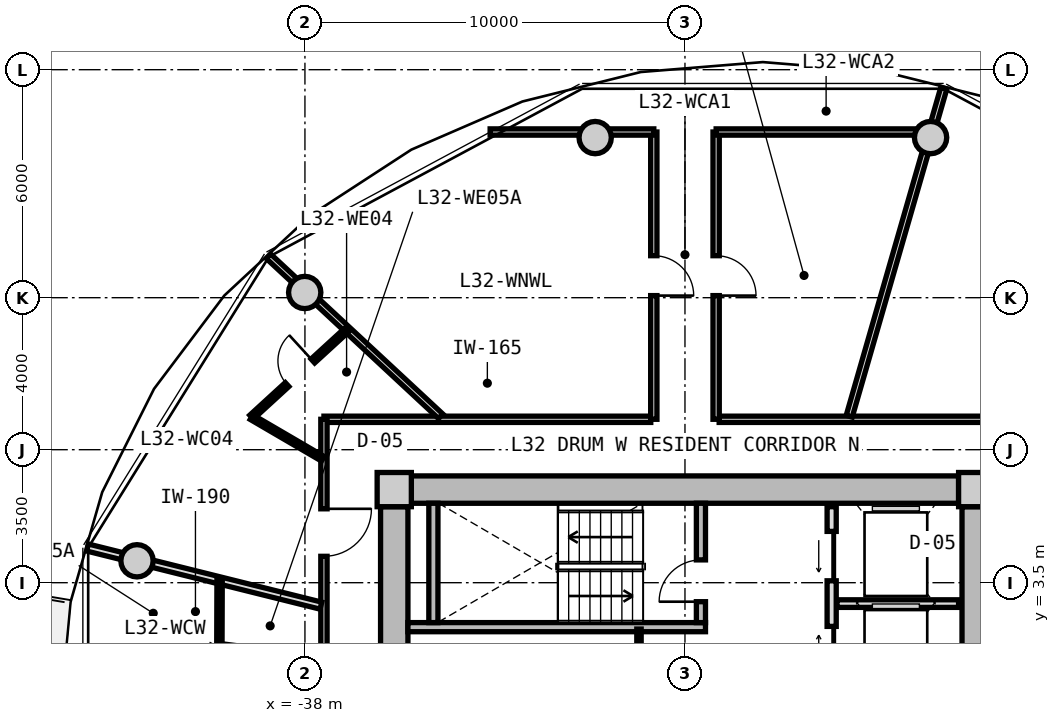
"""IFC4 building model, lengths in metres.
Left out: names, types, materials, properties, quantities, classifications, styles, units other than length and angle.
Written with IfcOpenShell. Run it as: python <this file> out.ifc"""

import sys

from ifc_helpers import new_model, si_unit, direction, frame, frame_2d, origin, origin_2d, place, context, subcontext, project, spatial, rectangle, circle, extrude, source, transform, mapped, element, fill, save


model = new_model("IFC4")
c1 = context("Model", 3, precision=1e-05, world=origin(), true_north=direction((0.0, 1.0)))
c2 = subcontext(c1, "Body", "Model", "MODEL_VIEW")
j1 = project(units=[si_unit("LENGTHUNIT", "METRE"), si_unit("PLANEANGLEUNIT", "RADIAN")], contexts=[c1])
p1 = place(None, origin())
s1 = spatial("IfcSite", under=j1, at=p1, CompositionType="ELEMENT")
p2 = place(p1, origin())
s2 = spatial("IfcBuilding", under=s1, at=p2, CompositionType="ELEMENT")
p3 = place(p2, frame((0.0, 0.0, 105.4)))
s3 = spatial("IfcBuildingStorey", under=s2, at=p3, CompositionType="ELEMENT", Elevation=105.4)
m1 = source(origin(), c2, "Body", "SweptSolid", [
    extrude(rectangle(XDim=0.9, YDim=0.9, at=origin_2d()), origin(), (0.0, 0.0, 1.0), 3.05),
])
for number, where, z_axis, x_axis in (
    (1, (-20.35, 5.95, 0.0), (0.0, 0.0, 1.0), (1.0, 0.0, 0.0)),
    (2, (-35.65, 5.95, 0.0), (0.0, 0.0, 1.0), (1.0, 0.0, 0.0)),
):
    element("IfcColumn", number, at=place(p3, frame(where, z_axis=z_axis, x_axis=x_axis)), inside=s3, PredefinedType="COLUMN", context=c2, shape_type="MappedRepresentation", body=[
        mapped(m1, transform((0.0, 0.0, 0.0), x_axis=(1.0, 0.0, 0.0), y_axis=(0.0, 1.0, 0.0), z_axis=(0.0, 0.0, 1.0), scale=1.0)),
    ])
m2 = source(origin(), c2, "Body", "SweptSolid", [
    extrude(rectangle(XDim=14.4, YDim=0.72, at=frame_2d((7.2, 0.0))), origin(), (0.0, 0.0, 1.0), 2.79),
])
p4 = place(p3, frame((-35.2, 5.95, 0.0), z_axis=(0.0, 0.0, 1.0), x_axis=(1.0, 0.0, 0.0)))
e3 = element("IfcWall", 3, at=p4, inside=s3, PredefinedType="SHEAR", context=c2, shape_type="MappedRepresentation", body=[
    mapped(m2, transform((0.0, 0.0, 0.0), x_axis=(1.0, 0.0, 0.0), y_axis=(0.0, 1.0, 0.0), z_axis=(0.0, 0.0, 1.0), scale=1.0)),
])
m3 = source(origin(), c2, "Body", "SweptSolid", [
    extrude(rectangle(XDim=11.0, YDim=0.72, at=frame_2d((5.5, 0.0))), origin(), (0.0, 0.0, 1.0), 2.79),
])
p5 = place(p3, frame((-35.65, -5.5, 0.0), z_axis=(0.0, 0.0, 1.0), x_axis=(0.0, 1.0, 0.0)))
e4 = element("IfcWall", 4, at=p5, inside=s3, PredefinedType="SHEAR", context=c2, shape_type="MappedRepresentation", body=[
    mapped(m3, transform((0.0, 0.0, 0.0), x_axis=(1.0, 0.0, 0.0), y_axis=(0.0, 1.0, 0.0), z_axis=(0.0, 0.0, 1.0), scale=1.0)),
])
p6 = place(p5, frame((3.8, 0.0, 0.0)))
e5 = element("IfcOpeningElement", 5, at=p6, cuts=e4, PredefinedType="OPENING", context=c2, shape_type="SweptSolid", body=[
    extrude(rectangle(XDim=1.2, YDim=2.15, at=frame_2d((0.6, 1.075))), frame((0.0, 0.37, 0.0), z_axis=(0.0, -1.0, 0.0), x_axis=(1.0, 0.0, 0.0)), (0.0, 0.0, 1.0), 0.74),
])
p7 = place(p3, frame((-20.35, 5.5, 0.0), z_axis=(0.0, 0.0, 1.0), x_axis=(0.0, -1.0, 0.0)))
e6 = element("IfcWall", 6, at=p7, inside=s3, PredefinedType="SHEAR", context=c2, shape_type="MappedRepresentation", body=[
    mapped(m3, transform((0.0, 0.0, 0.0), x_axis=(1.0, 0.0, 0.0), y_axis=(0.0, 1.0, 0.0), z_axis=(0.0, 0.0, 1.0), scale=1.0)),
])
p8 = place(p7, frame((5.65, 0.0, 0.0)))
e7 = element("IfcOpeningElement", 7, at=p8, cuts=e6, PredefinedType="OPENING", context=c2, shape_type="SweptSolid", body=[
    extrude(rectangle(XDim=1.2, YDim=2.15, at=frame_2d((0.6, 1.075))), frame((0.0, 0.37, 0.0), z_axis=(0.0, -1.0, 0.0), x_axis=(1.0, 0.0, 0.0)), (0.0, 0.0, 1.0), 0.74),
])
m4 = source(origin(), c2, "Body", "SweptSolid", [
    extrude(circle(Radius=0.425, at=origin_2d()), origin(), (0.0, 0.0, 1.0), 3.05),
])
for number, where, z_axis, x_axis in (
    (8, (-21.537, 15.213, 0.0), (0.0, 0.0, 1.0), (1.0, 0.0, 0.0)),
    (9, (-30.363, 15.213, 0.0), (0.0, 0.0, 1.0), (1.0, 0.0, 0.0)),
    (10, (-38.006, 11.137, 0.0), (0.0, 0.0, 1.0), (1.0, 0.0, 0.0)),
    (11, (-42.419, 4.076, 0.0), (0.0, 0.0, 1.0), (1.0, 0.0, 0.0)),
):
    element("IfcColumn", number, at=place(p3, frame(where, z_axis=z_axis, x_axis=x_axis)), inside=s3, PredefinedType="COLUMN", context=c2, shape_type="MappedRepresentation", body=[
        mapped(m4, transform((0.0, 0.0, 0.0), x_axis=(1.0, 0.0, 0.0), y_axis=(0.0, 1.0, 0.0), z_axis=(0.0, 0.0, 1.0), scale=1.0)),
    ])
m5 = source(origin(), c2, "Body", "SweptSolid", [
    extrude(rectangle(XDim=7.83, YDim=0.24, at=frame_2d((3.915, 0.0))), origin(), (0.0, 0.0, 1.0), 2.79),
])
p9 = place(p3, frame((-35.29, 2.33, 0.0), z_axis=(0.0, 0.0, 1.0), x_axis=(1.0, 0.0, 0.0)))
e12 = element("IfcWall", 12, at=p9, inside=s3, PredefinedType="PARTITIONING", context=c2, shape_type="MappedRepresentation", body=[
    mapped(m5, transform((0.0, 0.0, 0.0), x_axis=(1.0, 0.0, 0.0), y_axis=(0.0, 1.0, 0.0), z_axis=(0.0, 0.0, 1.0), scale=1.0)),
])
m6 = source(origin(), c2, "Body", "SweptSolid", [
    extrude(rectangle(XDim=3.14, YDim=0.24, at=frame_2d((1.57, 0.0))), origin(), (0.0, 0.0, 1.0), 2.79),
])
p10 = place(p3, frame((-34.62, 2.45, 0.0), z_axis=(0.0, 0.0, 1.0), x_axis=(0.0, 1.0, 0.0)))
e13 = element("IfcWall", 13, at=p10, inside=s3, PredefinedType="PARTITIONING", context=c2, shape_type="MappedRepresentation", body=[
    mapped(m6, transform((0.0, 0.0, 0.0), x_axis=(1.0, 0.0, 0.0), y_axis=(0.0, 1.0, 0.0), z_axis=(0.0, 0.0, 1.0), scale=1.0)),
])
p11 = place(p3, frame((-27.58, 2.45, 0.0), z_axis=(0.0, 0.0, 1.0), x_axis=(0.0, 1.0, 0.0)))
e14 = element("IfcWall", 14, at=p11, inside=s3, PredefinedType="PARTITIONING", context=c2, shape_type="MappedRepresentation", body=[
    mapped(m6, transform((0.0, 0.0, 0.0), x_axis=(1.0, 0.0, 0.0), y_axis=(0.0, 1.0, 0.0), z_axis=(0.0, 0.0, 1.0), scale=1.0)),
])
p12 = place(p11, frame((0.55, 0.0, 0.0)))
e15 = element("IfcOpeningElement", 15, at=p12, cuts=e14, PredefinedType="OPENING", context=c2, shape_type="SweptSolid", body=[
    extrude(rectangle(XDim=1.1, YDim=2.15, at=frame_2d((0.55, 1.075))), frame((0.0, 0.13, 0.0), z_axis=(0.0, -1.0, 0.0), x_axis=(1.0, 0.0, 0.0)), (0.0, 0.0, 1.0), 0.26),
])
m7 = source(origin(), c2, "Body", "SweptSolid", [
    extrude(rectangle(XDim=5.0, YDim=0.24, at=frame_2d((2.5, 0.0))), origin(), (0.0, 0.0, 1.0), 2.775),
])
p13 = place(p3, frame((-24.14, 0.5, 0.0), z_axis=(0.0, 0.0, 1.0), x_axis=(0.0, 1.0, 0.0)))
e16 = element("IfcWall", 16, at=p13, inside=s3, PredefinedType="PARTITIONING", context=c2, shape_type="MappedRepresentation", body=[
    mapped(m7, transform((0.0, 0.0, 0.0), x_axis=(1.0, 0.0, 0.0), y_axis=(0.0, 1.0, 0.0), z_axis=(0.0, 0.0, 1.0), scale=1.0)),
])
p14 = place(p13, frame((3.05, 0.0, 0.0)))
e17 = element("IfcOpeningElement", 17, at=p14, cuts=e16, PredefinedType="OPENING", context=c2, shape_type="SweptSolid", body=[
    extrude(rectangle(XDim=1.3, YDim=2.2, at=frame_2d((0.65, 1.1))), frame((0.0, 0.13, 0.0), z_axis=(0.0, -1.0, 0.0), x_axis=(1.0, 0.0, 0.0)), (0.0, 0.0, 1.0), 0.26),
])
p15 = place(p13, frame((0.55, 0.0, 0.0)))
e18 = element("IfcOpeningElement", 18, at=p15, cuts=e16, PredefinedType="OPENING", context=c2, shape_type="SweptSolid", body=[
    extrude(rectangle(XDim=1.3, YDim=2.2, at=frame_2d((0.65, 1.1))), frame((0.0, 0.13, 0.0), z_axis=(0.0, -1.0, 0.0), x_axis=(1.0, 0.0, 0.0)), (0.0, 0.0, 1.0), 0.26),
])
m8 = source(origin(), c2, "Body", "SweptSolid", [
    extrude(rectangle(XDim=3.2, YDim=0.2, at=frame_2d((1.6, 0.0))), origin(), (0.0, 0.0, 1.0), 2.775),
])
p16 = place(p3, frame((-24.0, 2.95, 0.0), z_axis=(0.0, 0.0, 1.0), x_axis=(1.0, 0.0, 0.0)))
e19 = element("IfcWall", 19, at=p16, inside=s3, PredefinedType="PARTITIONING", context=c2, shape_type="MappedRepresentation", body=[
    mapped(m8, transform((0.0, 0.0, 0.0), x_axis=(1.0, 0.0, 0.0), y_axis=(0.0, 1.0, 0.0), z_axis=(0.0, 0.0, 1.0), scale=1.0)),
])
m9 = source(origin(), c2, "Body", "SweptSolid", [
    extrude(rectangle(XDim=2.33, YDim=0.115, at=frame_2d((1.165, 0.0))), origin(), (0.0, 0.0, 1.0), 2.775),
])
p17 = place(p3, frame((-29.21, -0.05, 0.0), z_axis=(0.0, 0.0, 1.0), x_axis=(0.0, 1.0, 0.0)))
e20 = element("IfcWall", 20, at=p17, inside=s3, PredefinedType="PARTITIONING", context=c2, shape_type="MappedRepresentation", body=[
    mapped(m9, transform((0.0, 0.0, 0.0), x_axis=(1.0, 0.0, 0.0), y_axis=(0.0, 1.0, 0.0), z_axis=(0.0, 0.0, 1.0), scale=1.0)),
])
m10 = source(origin(), c2, "Body", "SweptSolid", [
    extrude(rectangle(XDim=8.6, YDim=0.165, at=frame_2d((4.3, 0.0))), origin(), (0.0, 0.0, 1.0), 2.775),
])
for number, where, z_axis, x_axis in (
    (21, (-37.5, 7.8, 0.0), (0.0, 0.0, 1.0), (1.0, 0.0, 0.0)),
    (22, (-27.1, 7.8, 0.0), (0.0, 0.0, 1.0), (1.0, 0.0, 0.0)),
):
    element("IfcWall", number, at=place(p3, frame(where, z_axis=z_axis, x_axis=x_axis)), inside=s3, PredefinedType="PARTITIONING", context=c2, shape_type="MappedRepresentation", body=[
        mapped(m10, transform((0.0, 0.0, 0.0), x_axis=(1.0, 0.0, 0.0), y_axis=(0.0, 1.0, 0.0), z_axis=(0.0, 0.0, 1.0), scale=1.0)),
    ])
m11 = source(origin(), c2, "Body", "SweptSolid", [
    extrude(rectangle(XDim=15.6, YDim=0.165, at=frame_2d((7.8, 0.0))), origin(), (0.0, 0.0, 1.0), 2.775),
])
p18 = place(p3, frame((-37.5, -7.8, 0.0), z_axis=(0.0, 0.0, 1.0), x_axis=(0.0, 1.0, 0.0)))
e23 = element("IfcWall", 23, at=p18, inside=s3, PredefinedType="PARTITIONING", context=c2, shape_type="MappedRepresentation", body=[
    mapped(m11, transform((0.0, 0.0, 0.0), x_axis=(1.0, 0.0, 0.0), y_axis=(0.0, 1.0, 0.0), z_axis=(0.0, 0.0, 1.0), scale=1.0)),
])
p19 = place(p18, frame((11.994, 0.0, 0.0)))
e24 = element("IfcOpeningElement", 24, at=p19, cuts=e23, PredefinedType="OPENING", context=c2, shape_type="SweptSolid", body=[
    extrude(rectangle(XDim=1.25, YDim=2.2, at=frame_2d((0.625, 1.1))), frame((0.0, 0.093, 0.0), z_axis=(0.0, -1.0, 0.0), x_axis=(1.0, 0.0, 0.0)), (0.0, 0.0, 1.0), 0.185),
])
p20 = place(p18, frame((7.984, 0.0, 0.0)))
e25 = element("IfcOpeningElement", 25, at=p20, cuts=e23, PredefinedType="OPENING", context=c2, shape_type="SweptSolid", body=[
    extrude(rectangle(XDim=1.05, YDim=2.15, at=frame_2d((0.525, 1.075))), frame((0.0, 0.093, 0.0), z_axis=(0.0, -1.0, 0.0), x_axis=(1.0, 0.0, 0.0)), (0.0, 0.0, 1.0), 0.185),
])
p21 = place(p18, frame((5.777, 0.0, 0.0)))
e26 = element("IfcOpeningElement", 26, at=p21, cuts=e23, PredefinedType="OPENING", context=c2, shape_type="SweptSolid", body=[
    extrude(rectangle(XDim=1.05, YDim=2.15, at=frame_2d((0.525, 1.075))), frame((0.0, 0.093, 0.0), z_axis=(0.0, -1.0, 0.0), x_axis=(1.0, 0.0, 0.0)), (0.0, 0.0, 1.0), 0.185),
])
m12 = source(origin(), c2, "Body", "SweptSolid", [
    extrude(rectangle(XDim=8.989, YDim=0.165, at=frame_2d((4.495, 0.0))), origin(), (0.0, 0.0, 1.0), 2.275),
])
p22 = place(p3, frame((-23.678, 7.88, 0.0), z_axis=(0.0, 0.0, 1.0), x_axis=(0.27702323008, 0.960863221274, 0.0)))
e27 = element("IfcWall", 27, at=p22, inside=s3, PredefinedType="PARTITIONING", context=c2, shape_type="MappedRepresentation", body=[
    mapped(m12, transform((0.0, 0.0, 0.0), x_axis=(1.0, 0.0, 0.0), y_axis=(0.0, 1.0, 0.0), z_axis=(0.0, 0.0, 1.0), scale=1.0)),
])
m13 = source(origin(), c2, "Body", "SweptSolid", [
    extrude(rectangle(XDim=6.187, YDim=0.165, at=frame_2d((3.093, 0.0))), origin(), (0.0, 0.0, 1.0), 2.275),
])
p23 = place(p3, frame((-34.429, 7.88, 0.0), z_axis=(0.0, 0.0, 1.0), x_axis=(-0.732501077882, 0.680765870841, 0.0)))
e28 = element("IfcWall", 28, at=p23, inside=s3, PredefinedType="PARTITIONING", context=c2, shape_type="MappedRepresentation", body=[
    mapped(m13, transform((0.0, 0.0, 0.0), x_axis=(1.0, 0.0, 0.0), y_axis=(0.0, 1.0, 0.0), z_axis=(0.0, 0.0, 1.0), scale=1.0)),
])
m14 = source(origin(), c2, "Body", "SweptSolid", [
    extrude(rectangle(XDim=7.56, YDim=0.165, at=frame_2d((3.78, 0.0))), origin(), (0.0, 0.0, 1.0), 2.775),
])
p24 = place(p3, frame((-28.82, 7.8, 0.0), z_axis=(0.0, 0.0, 1.0), x_axis=(0.0, 1.0, 0.0)))
e29 = element("IfcWall", 29, at=p24, inside=s3, PredefinedType="PARTITIONING", context=c2, shape_type="MappedRepresentation", body=[
    mapped(m14, transform((0.0, 0.0, 0.0), x_axis=(1.0, 0.0, 0.0), y_axis=(0.0, 1.0, 0.0), z_axis=(0.0, 0.0, 1.0), scale=1.0)),
])
p25 = place(p24, frame((3.255, 0.0, 0.0)))
e30 = element("IfcOpeningElement", 30, at=p25, cuts=e29, PredefinedType="OPENING", context=c2, shape_type="SweptSolid", body=[
    extrude(rectangle(XDim=1.05, YDim=2.15, at=frame_2d((0.525, 1.075))), frame((0.0, 0.093, 0.0), z_axis=(0.0, -1.0, 0.0), x_axis=(1.0, 0.0, 0.0)), (0.0, 0.0, 1.0), 0.185),
])
m15 = source(origin(), c2, "Body", "SweptSolid", [
    extrude(rectangle(XDim=4.307, YDim=0.165, at=frame_2d((2.153, 0.0))), origin(), (0.0, 0.0, 1.0), 2.275),
])
p26 = place(p3, frame((-33.127, 15.36, 0.0), z_axis=(0.0, 0.0, 1.0), x_axis=(1.0, 0.0, 0.0)))
e31 = element("IfcWall", 31, at=p26, inside=s3, PredefinedType="PARTITIONING", context=c2, shape_type="MappedRepresentation", body=[
    mapped(m15, transform((0.0, 0.0, 0.0), x_axis=(1.0, 0.0, 0.0), y_axis=(0.0, 1.0, 0.0), z_axis=(0.0, 0.0, 1.0), scale=1.0)),
])
p27 = place(p3, frame((-27.18, 7.8, 0.0), z_axis=(0.0, 0.0, 1.0), x_axis=(0.0, 1.0, 0.0)))
e32 = element("IfcWall", 32, at=p27, inside=s3, PredefinedType="PARTITIONING", context=c2, shape_type="MappedRepresentation", body=[
    mapped(m14, transform((0.0, 0.0, 0.0), x_axis=(1.0, 0.0, 0.0), y_axis=(0.0, 1.0, 0.0), z_axis=(0.0, 0.0, 1.0), scale=1.0)),
])
p28 = place(p27, frame((3.255, 0.0, 0.0)))
e33 = element("IfcOpeningElement", 33, at=p28, cuts=e32, PredefinedType="OPENING", context=c2, shape_type="SweptSolid", body=[
    extrude(rectangle(XDim=1.05, YDim=2.15, at=frame_2d((0.525, 1.075))), frame((0.0, 0.093, 0.0), z_axis=(0.0, -1.0, 0.0), x_axis=(1.0, 0.0, 0.0)), (0.0, 0.0, 1.0), 0.185),
])
m16 = source(origin(), c2, "Body", "SweptSolid", [
    extrude(rectangle(XDim=5.814, YDim=0.165, at=frame_2d((2.907, 0.0))), origin(), (0.0, 0.0, 1.0), 2.275),
])
p29 = place(p3, frame((-27.18, 15.36, 0.0), z_axis=(0.0, 0.0, 1.0), x_axis=(1.0, 0.0, 0.0)))
e34 = element("IfcWall", 34, at=p29, inside=s3, PredefinedType="PARTITIONING", context=c2, shape_type="MappedRepresentation", body=[
    mapped(m16, transform((0.0, 0.0, 0.0), x_axis=(1.0, 0.0, 0.0), y_axis=(0.0, 1.0, 0.0), z_axis=(0.0, 0.0, 1.0), scale=1.0)),
])
m17 = source(origin(), c2, "Body", "SweptSolid", [
    extrude(rectangle(XDim=6.331, YDim=0.19, at=frame_2d((3.165, 0.0))), origin(), (0.0, 0.0, 1.0), 2.275),
])
p30 = place(p3, frame((-37.58, 2.896, 0.0), z_axis=(0.0, 0.0, 1.0), x_axis=(-0.97036440661, 0.241646267062, 0.0)))
e35 = element("IfcWall", 35, at=p30, inside=s3, PredefinedType="PARTITIONING", context=c2, shape_type="MappedRepresentation", body=[
    mapped(m17, transform((0.0, 0.0, 0.0), x_axis=(1.0, 0.0, 0.0), y_axis=(0.0, 1.0, 0.0), z_axis=(0.0, 0.0, 1.0), scale=1.0)),
])
m18 = source(origin(), c2, "Body", "SweptSolid", [
    extrude(rectangle(XDim=2.172, YDim=0.14, at=frame_2d((1.086, 0.0))), origin(), (0.0, 0.0, 1.0), 2.775),
])
p31 = place(p3, frame((-37.53, 6.762, 0.0), z_axis=(0.0, 0.0, 1.0), x_axis=(-0.863562702562, 0.504241468688, 0.0)))
e36 = element("IfcWall", 36, at=p31, inside=s3, PredefinedType="PARTITIONING", context=c2, shape_type="MappedRepresentation", body=[
    mapped(m18, transform((0.0, 0.0, 0.0), x_axis=(1.0, 0.0, 0.0), y_axis=(0.0, 1.0, 0.0), z_axis=(0.0, 0.0, 1.0), scale=1.0)),
])
m19 = source(origin(), c2, "Body", "SweptSolid", [
    extrude(rectangle(XDim=3.457, YDim=0.14, at=frame_2d((1.729, 0.0))), origin(), (0.0, 0.0, 1.0), 2.775),
])
p32 = place(p3, frame((-39.405, 7.857, 0.0), z_axis=(0.0, 0.0, 1.0), x_axis=(0.737567375492, 0.675273549467, 0.0)))
e37 = element("IfcWall", 37, at=p32, inside=s3, PredefinedType="PARTITIONING", context=c2, shape_type="MappedRepresentation", body=[
    mapped(m19, transform((0.0, 0.0, 0.0), x_axis=(1.0, 0.0, 0.0), y_axis=(0.0, 1.0, 0.0), z_axis=(0.0, 0.0, 1.0), scale=1.0)),
])
p33 = place(p32, frame((1.268, 0.0, 0.0)))
e38 = element("IfcOpeningElement", 38, at=p33, cuts=e37, PredefinedType="OPENING", context=c2, shape_type="SweptSolid", body=[
    extrude(rectangle(XDim=0.92, YDim=2.1, at=frame_2d((0.46, 1.05))), frame((0.0, 0.08, 0.0), z_axis=(0.0, -1.0, 0.0), x_axis=(1.0, 0.0, 0.0)), (0.0, 0.0, 1.0), 0.16),
])
m20 = source(origin(), c2, "Body", "SweptSolid", [
    extrude(rectangle(XDim=1.749, YDim=0.14, at=frame_2d((0.875, 0.0))), origin(), (0.0, 0.0, 1.0), 2.775),
])
p34 = place(p3, frame((-40.251, 1.831, 0.0), z_axis=(0.0, 0.0, 1.0), x_axis=(0.003350064953, 0.999994388517, 0.0)))
e39 = element("IfcWall", 39, at=p34, inside=s3, PredefinedType="PARTITIONING", context=c2, shape_type="MappedRepresentation", body=[
    mapped(m20, transform((0.0, 0.0, 0.0), x_axis=(1.0, 0.0, 0.0), y_axis=(0.0, 1.0, 0.0), z_axis=(0.0, 0.0, 1.0), scale=1.0)),
])
m21 = source(origin(), c2, "Body", "SweptSolid", [
    extrude(rectangle(XDim=1.1, YDim=2.15, at=frame_2d((0.55, 1.075))), frame((0.0, 0.025, 0.0), z_axis=(0.0, -1.0, 0.0), x_axis=(1.0, 0.0, 0.0)), (0.0, 0.0, 1.0), 0.05),
])
p35 = place(p12, origin())
e40 = element("IfcDoor", 40, at=p35, inside=s3, OperationType="SINGLE_SWING_LEFT", PredefinedType="DOOR", context=c2, shape_type="MappedRepresentation", body=[
    mapped(m21, transform((0.0, 0.0, 0.0), x_axis=(1.0, 0.0, 0.0), y_axis=(0.0, 1.0, 0.0), z_axis=(0.0, 0.0, 1.0), scale=1.0)),
])
fill(e15, e40)
m22 = source(origin(), c2, "Body", "SweptSolid", [
    extrude(rectangle(XDim=1.3, YDim=2.2, at=frame_2d((0.65, 1.1))), frame((0.0, 0.025, 0.0), z_axis=(0.0, -1.0, 0.0), x_axis=(1.0, 0.0, 0.0)), (0.0, 0.0, 1.0), 0.05),
])
p36 = place(p14, origin())
e41 = element("IfcDoor", 41, at=p36, inside=s3, OperationType="SLIDING_TO_LEFT", PredefinedType="DOOR", context=c2, shape_type="MappedRepresentation", body=[
    mapped(m22, transform((0.0, 0.0, 0.0), x_axis=(1.0, 0.0, 0.0), y_axis=(0.0, 1.0, 0.0), z_axis=(0.0, 0.0, 1.0), scale=1.0)),
])
fill(e17, e41)
p37 = place(p15, origin())
e42 = element("IfcDoor", 42, at=p37, inside=s3, OperationType="SLIDING_TO_RIGHT", PredefinedType="DOOR", context=c2, shape_type="MappedRepresentation", body=[
    mapped(m22, transform((0.0, 0.0, 0.0), x_axis=(1.0, 0.0, 0.0), y_axis=(0.0, 1.0, 0.0), z_axis=(0.0, 0.0, 1.0), scale=1.0)),
])
fill(e18, e42)
m23 = source(origin(), c2, "Body", "SweptSolid", [
    extrude(rectangle(XDim=1.05, YDim=2.15, at=frame_2d((0.525, 1.075))), frame((0.0, 0.025, 0.0), z_axis=(0.0, -1.0, 0.0), x_axis=(1.0, 0.0, 0.0)), (0.0, 0.0, 1.0), 0.05),
])
p38 = place(p25, frame((1.05, 0.0, 0.0), z_axis=(0.0, 0.0, 1.0), x_axis=(-1.0, 0.0, 0.0)))
e43 = element("IfcDoor", 43, at=p38, inside=s3, OperationType="SINGLE_SWING_RIGHT", PredefinedType="DOOR", context=c2, shape_type="MappedRepresentation", body=[
    mapped(m23, transform((0.0, 0.0, 0.0), x_axis=(1.0, 0.0, 0.0), y_axis=(0.0, 1.0, 0.0), z_axis=(0.0, 0.0, 1.0), scale=1.0)),
])
fill(e30, e43)
p39 = place(p28, frame((1.05, 0.0, 0.0), z_axis=(0.0, 0.0, 1.0), x_axis=(-1.0, 0.0, 0.0)))
e44 = element("IfcDoor", 44, at=p39, inside=s3, OperationType="SINGLE_SWING_RIGHT", PredefinedType="DOOR", context=c2, shape_type="MappedRepresentation", body=[
    mapped(m23, transform((0.0, 0.0, 0.0), x_axis=(1.0, 0.0, 0.0), y_axis=(0.0, 1.0, 0.0), z_axis=(0.0, 0.0, 1.0), scale=1.0)),
])
fill(e33, e44)
m24 = source(origin(), c2, "Body", "SweptSolid", [
    extrude(rectangle(XDim=1.25, YDim=2.2, at=frame_2d((0.625, 1.1))), frame((0.0, 0.025, 0.0), z_axis=(0.0, -1.0, 0.0), x_axis=(1.0, 0.0, 0.0)), (0.0, 0.0, 1.0), 0.05),
])
p40 = place(p19, frame((1.25, 0.0, 0.0), z_axis=(0.0, 0.0, 1.0), x_axis=(-1.0, 0.0, 0.0)))
e45 = element("IfcDoor", 45, at=p40, inside=s3, OperationType="SINGLE_SWING_LEFT", PredefinedType="DOOR", context=c2, shape_type="MappedRepresentation", body=[
    mapped(m24, transform((0.0, 0.0, 0.0), x_axis=(1.0, 0.0, 0.0), y_axis=(0.0, 1.0, 0.0), z_axis=(0.0, 0.0, 1.0), scale=1.0)),
])
fill(e24, e45)
m25 = source(origin(), c2, "Body", "SweptSolid", [
    extrude(rectangle(XDim=0.92, YDim=2.1, at=frame_2d((0.46, 1.05))), frame((0.0, 0.025, 0.0), z_axis=(0.0, -1.0, 0.0), x_axis=(1.0, 0.0, 0.0)), (0.0, 0.0, 1.0), 0.05),
])
p41 = place(p33, origin())
e46 = element("IfcDoor", 46, at=p41, inside=s3, OperationType="SINGLE_SWING_RIGHT", PredefinedType="DOOR", context=c2, shape_type="MappedRepresentation", body=[
    mapped(m25, transform((0.0, 0.0, 0.0), x_axis=(1.0, 0.0, 0.0), y_axis=(0.0, 1.0, 0.0), z_axis=(0.0, 0.0, 1.0), scale=1.0)),
])
fill(e38, e46)
save(model, sys.argv[1])
